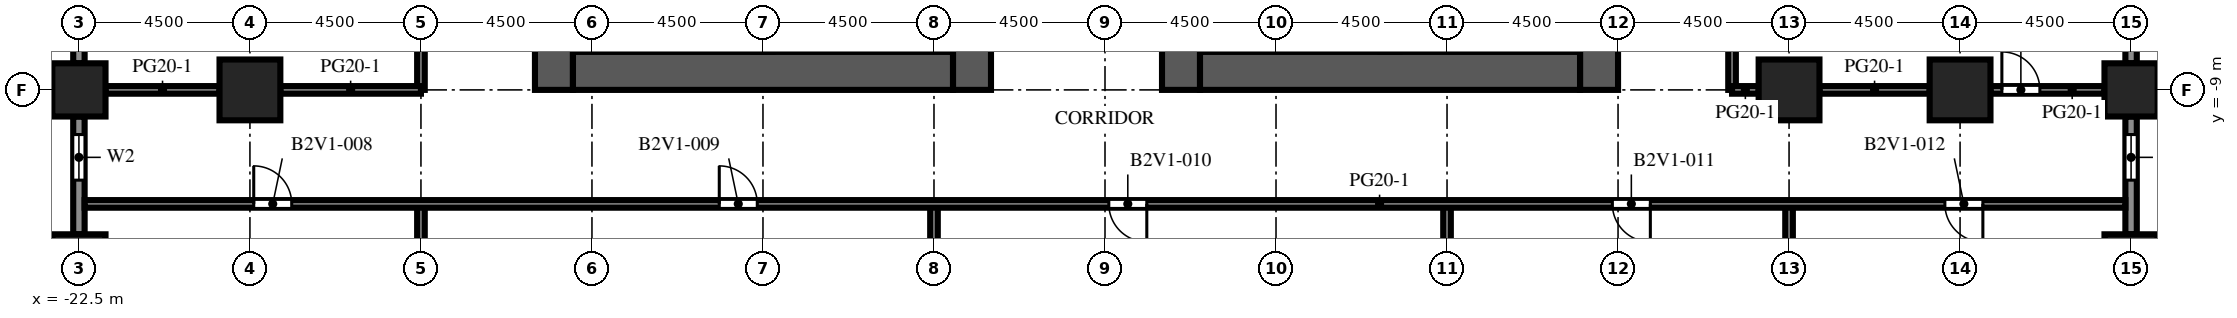
"""IFC4 building model, lengths in metres.
Left out: names, types, materials, properties, quantities, classifications, styles, units other than length and angle.
Written with IfcOpenShell. Run it as: python <this file> out.ifc"""

import sys

from ifc_helpers import new_model, si_unit, direction, frame, frame_2d, origin, origin_2d, place, context, subcontext, project, spatial, rectangle, extrude, element, fill, save


model = new_model("IFC4")
c1 = context("Model", 3, precision=1e-05, world=origin(), true_north=direction((0.0, 1.0)))
c2 = subcontext(c1, "Body", "Model", "MODEL_VIEW")
j1 = project(units=[si_unit("LENGTHUNIT", "METRE"), si_unit("PLANEANGLEUNIT", "RADIAN")], contexts=[c1])
p1 = place(None, origin())
s1 = spatial("IfcSite", under=j1, at=p1, CompositionType="ELEMENT")
p2 = place(p1, origin())
s2 = spatial("IfcBuilding", under=s1, at=p2, CompositionType="ELEMENT")
p3 = place(p2, frame((0.0, 0.0, 54.2)))
s3 = spatial("IfcBuildingStorey", under=s2, at=p3, CompositionType="ELEMENT", Elevation=54.2)
for number, where, z_axis, x_axis in (
    (1, (-22.5, -13.5, 0.0), (0.0, 0.0, 1.0), (1.0, 0.0, 0.0)),
    (2, (-22.5, -9.0, 0.0), (0.0, 0.0, 1.0), (1.0, 0.0, 0.0)),
    (3, (31.5, -13.5, 0.0), (0.0, 0.0, 1.0), (1.0, 0.0, 0.0)),
    (4, (31.5, -9.0, 0.0), (0.0, 0.0, 1.0), (1.0, 0.0, 0.0)),
):
    element("IfcColumn", number, at=place(p3, frame(where, z_axis=z_axis, x_axis=x_axis)), inside=s3, PredefinedType="COLUMN", context=c2, shape_type="SweptSolid", body=[
        extrude(rectangle(XDim=1.4, YDim=1.4, at=origin_2d()), origin(), (0.0, 0.0, 1.0), 4.1),
    ])
for number, where, z_axis, x_axis in (
    (5, (-18.0, -9.0, 0.0), (0.0, 0.0, 1.0), (1.0, 0.0, 0.0)),
    (6, (22.5, -9.0, 0.0), (0.0, 0.0, 1.0), (1.0, 0.0, 0.0)),
    (7, (27.0, -9.0, 0.0), (0.0, 0.0, 1.0), (1.0, 0.0, 0.0)),
):
    element("IfcColumn", number, at=place(p3, frame(where, z_axis=z_axis, x_axis=x_axis)), inside=s3, PredefinedType="COLUMN", context=c2, shape_type="SweptSolid", body=[
        extrude(rectangle(XDim=1.6, YDim=1.6, at=origin_2d()), origin(), (0.0, 0.0, 1.0), 4.1),
    ])
p4 = place(p3, frame((-10.0, -9.0, 0.0), z_axis=(0.0, 0.0, 1.0), x_axis=(0.0, 1.0, 0.0)))
e8 = element("IfcWall", 8, at=p4, inside=s3, PredefinedType="SHEAR", context=c2, shape_type="SweptSolid", body=[
    extrude(rectangle(XDim=27.5, YDim=1.0, at=frame_2d((13.75, 0.0))), origin(), (0.0, 0.0, 1.0), 4.1),
])
p5 = place(p4, frame((12.55, 0.0, 0.0)))
e9 = element("IfcOpeningElement", 9, at=p5, cuts=e8, PredefinedType="OPENING", context=c2, shape_type="SweptSolid", body=[
    extrude(rectangle(XDim=2.4, YDim=2.4, at=frame_2d((1.2, 1.2))), frame((0.0, 0.51, 0.0), z_axis=(0.0, -1.0, 0.0), x_axis=(1.0, 0.0, 0.0)), (0.0, 0.0, 1.0), 1.02),
])
p6 = place(p4, frame((6.825, 0.0, 0.0)))
e10 = element("IfcOpeningElement", 10, at=p6, cuts=e8, PredefinedType="OPENING", context=c2, shape_type="SweptSolid", body=[
    extrude(rectangle(XDim=1.2, YDim=2.1, at=frame_2d((0.6, 1.05))), frame((0.0, 0.51, 0.0), z_axis=(0.0, -1.0, 0.0), x_axis=(1.0, 0.0, 0.0)), (0.0, 0.0, 1.0), 1.02),
])
p7 = place(p4, frame((19.475, 0.0, 0.0)))
e11 = element("IfcOpeningElement", 11, at=p7, cuts=e8, PredefinedType="OPENING", context=c2, shape_type="SweptSolid", body=[
    extrude(rectangle(XDim=1.2, YDim=2.1, at=frame_2d((0.6, 1.05))), frame((0.0, 0.51, 0.0), z_axis=(0.0, -1.0, 0.0), x_axis=(1.0, 0.0, 0.0)), (0.0, 0.0, 1.0), 1.02),
])
p8 = place(p3, frame((1.0, -9.0, 0.0), z_axis=(0.0, 0.0, 1.0), x_axis=(0.0, 1.0, 0.0)))
e12 = element("IfcWall", 12, at=p8, inside=s3, PredefinedType="SHEAR", context=c2, shape_type="SweptSolid", body=[
    extrude(rectangle(XDim=27.5, YDim=1.0, at=frame_2d((13.75, 0.0))), origin(), (0.0, 0.0, 1.0), 4.1),
])
p9 = place(p8, frame((12.55, 0.0, 0.0)))
e13 = element("IfcOpeningElement", 13, at=p9, cuts=e12, PredefinedType="OPENING", context=c2, shape_type="SweptSolid", body=[
    extrude(rectangle(XDim=2.4, YDim=2.4, at=frame_2d((1.2, 1.2))), frame((0.0, 0.51, 0.0), z_axis=(0.0, -1.0, 0.0), x_axis=(1.0, 0.0, 0.0)), (0.0, 0.0, 1.0), 1.02),
])
p10 = place(p8, frame((4.025, 0.0, 0.0)))
e14 = element("IfcOpeningElement", 14, at=p10, cuts=e12, PredefinedType="OPENING", context=c2, shape_type="SweptSolid", body=[
    extrude(rectangle(XDim=1.2, YDim=2.1, at=frame_2d((0.6, 1.05))), frame((0.0, 0.51, 0.0), z_axis=(0.0, -1.0, 0.0), x_axis=(1.0, 0.0, 0.0)), (0.0, 0.0, 1.0), 1.02),
])
p11 = place(p8, frame((22.275, 0.0, 0.0)))
e15 = element("IfcOpeningElement", 15, at=p11, cuts=e12, PredefinedType="OPENING", context=c2, shape_type="SweptSolid", body=[
    extrude(rectangle(XDim=1.2, YDim=2.1, at=frame_2d((0.6, 1.05))), frame((0.0, 0.51, 0.0), z_axis=(0.0, -1.0, 0.0), x_axis=(1.0, 0.0, 0.0)), (0.0, 0.0, 1.0), 1.02),
])
p12 = place(p3, frame((-9.5, -8.5, 0.0), z_axis=(0.0, 0.0, 1.0), x_axis=(1.0, 0.0, 0.0)))
e16 = element("IfcWall", 16, at=p12, inside=s3, PredefinedType="SHEAR", context=c2, shape_type="SweptSolid", body=[
    extrude(rectangle(XDim=10.0, YDim=1.0, at=frame_2d((5.0, 0.0))), origin(), (0.0, 0.0, 1.0), 4.1),
])
p13 = place(p3, frame((6.5, -9.0, 0.0), z_axis=(0.0, 0.0, 1.0), x_axis=(0.0, 1.0, 0.0)))
e17 = element("IfcWall", 17, at=p13, inside=s3, PredefinedType="SHEAR", context=c2, shape_type="SweptSolid", body=[
    extrude(rectangle(XDim=27.5, YDim=1.0, at=frame_2d((13.75, 0.0))), origin(), (0.0, 0.0, 1.0), 4.1),
])
p14 = place(p13, frame((12.55, 0.0, 0.0)))
e18 = element("IfcOpeningElement", 18, at=p14, cuts=e17, PredefinedType="OPENING", context=c2, shape_type="SweptSolid", body=[
    extrude(rectangle(XDim=2.4, YDim=2.4, at=frame_2d((1.2, 1.2))), frame((0.0, 0.51, 0.0), z_axis=(0.0, -1.0, 0.0), x_axis=(1.0, 0.0, 0.0)), (0.0, 0.0, 1.0), 1.02),
])
p15 = place(p13, frame((4.025, 0.0, 0.0)))
e19 = element("IfcOpeningElement", 19, at=p15, cuts=e17, PredefinedType="OPENING", context=c2, shape_type="SweptSolid", body=[
    extrude(rectangle(XDim=1.2, YDim=2.1, at=frame_2d((0.6, 1.05))), frame((0.0, 0.51, 0.0), z_axis=(0.0, -1.0, 0.0), x_axis=(1.0, 0.0, 0.0)), (0.0, 0.0, 1.0), 1.02),
])
p16 = place(p13, frame((22.275, 0.0, 0.0)))
e20 = element("IfcOpeningElement", 20, at=p16, cuts=e17, PredefinedType="OPENING", context=c2, shape_type="SweptSolid", body=[
    extrude(rectangle(XDim=1.2, YDim=2.1, at=frame_2d((0.6, 1.05))), frame((0.0, 0.51, 0.0), z_axis=(0.0, -1.0, 0.0), x_axis=(1.0, 0.0, 0.0)), (0.0, 0.0, 1.0), 1.02),
])
p17 = place(p3, frame((17.5, -9.0, 0.0), z_axis=(0.0, 0.0, 1.0), x_axis=(0.0, 1.0, 0.0)))
e21 = element("IfcWall", 21, at=p17, inside=s3, PredefinedType="SHEAR", context=c2, shape_type="SweptSolid", body=[
    extrude(rectangle(XDim=27.5, YDim=1.0, at=frame_2d((13.75, 0.0))), origin(), (0.0, 0.0, 1.0), 4.1),
])
p18 = place(p17, frame((12.55, 0.0, 0.0)))
e22 = element("IfcOpeningElement", 22, at=p18, cuts=e21, PredefinedType="OPENING", context=c2, shape_type="SweptSolid", body=[
    extrude(rectangle(XDim=2.4, YDim=2.4, at=frame_2d((1.2, 1.2))), frame((0.0, 0.51, 0.0), z_axis=(0.0, -1.0, 0.0), x_axis=(1.0, 0.0, 0.0)), (0.0, 0.0, 1.0), 1.02),
])
p19 = place(p17, frame((6.825, 0.0, 0.0)))
e23 = element("IfcOpeningElement", 23, at=p19, cuts=e21, PredefinedType="OPENING", context=c2, shape_type="SweptSolid", body=[
    extrude(rectangle(XDim=1.2, YDim=2.1, at=frame_2d((0.6, 1.05))), frame((0.0, 0.51, 0.0), z_axis=(0.0, -1.0, 0.0), x_axis=(1.0, 0.0, 0.0)), (0.0, 0.0, 1.0), 1.02),
])
p20 = place(p17, frame((19.475, 0.0, 0.0)))
e24 = element("IfcOpeningElement", 24, at=p20, cuts=e21, PredefinedType="OPENING", context=c2, shape_type="SweptSolid", body=[
    extrude(rectangle(XDim=1.2, YDim=2.1, at=frame_2d((0.6, 1.05))), frame((0.0, 0.51, 0.0), z_axis=(0.0, -1.0, 0.0), x_axis=(1.0, 0.0, 0.0)), (0.0, 0.0, 1.0), 1.02),
])
p21 = place(p3, frame((7.0, -8.5, 0.0), z_axis=(0.0, 0.0, 1.0), x_axis=(1.0, 0.0, 0.0)))
e25 = element("IfcWall", 25, at=p21, inside=s3, PredefinedType="SHEAR", context=c2, shape_type="SweptSolid", body=[
    extrude(rectangle(XDim=10.0, YDim=1.0, at=frame_2d((5.0, 0.0))), origin(), (0.0, 0.0, 1.0), 4.1),
])
p22 = place(p3, frame((31.5, -9.7, 0.0), z_axis=(0.0, 0.0, 1.0), x_axis=(0.0, -1.0, 0.0)))
e26 = element("IfcWall", 26, at=p22, inside=s3, PredefinedType="SOLIDWALL", context=c2, shape_type="SweptSolid", body=[
    extrude(rectangle(XDim=3.1, YDim=0.3, at=frame_2d((1.55, 0.0))), origin(), (0.0, 0.0, 1.0), 2.75),
])
p23 = place(p22, frame((0.475, 0.0, 0.8)))
e27 = element("IfcOpeningElement", 27, at=p23, cuts=e26, PredefinedType="OPENING", context=c2, shape_type="SweptSolid", body=[
    extrude(rectangle(XDim=1.2, YDim=1.7, at=frame_2d((0.6, 0.85))), frame((0.0, 0.16, 0.0), z_axis=(0.0, -1.0, 0.0), x_axis=(1.0, 0.0, 0.0)), (0.0, 0.0, 1.0), 0.32),
])
p24 = place(p3, frame((31.5, -5.2, 0.0), z_axis=(0.0, 0.0, 1.0), x_axis=(0.0, -1.0, 0.0)))
e28 = element("IfcWall", 28, at=p24, inside=s3, PredefinedType="SOLIDWALL", context=c2, shape_type="SweptSolid", body=[
    extrude(rectangle(XDim=3.1, YDim=0.3, at=frame_2d((1.55, 0.0))), origin(), (0.0, 0.0, 1.0), 2.75),
])
p25 = place(p24, frame((0.35, 0.0, 0.8)))
e29 = element("IfcOpeningElement", 29, at=p25, cuts=e28, PredefinedType="OPENING", context=c2, shape_type="SweptSolid", body=[
    extrude(rectangle(XDim=2.4, YDim=1.7, at=frame_2d((1.2, 0.85))), frame((0.0, 0.16, 0.0), z_axis=(0.0, -1.0, 0.0), x_axis=(1.0, 0.0, 0.0)), (0.0, 0.0, 1.0), 0.32),
])
p26 = place(p3, frame((-22.5, -8.3, 0.0), z_axis=(0.0, 0.0, 1.0), x_axis=(0.0, 1.0, 0.0)))
e30 = element("IfcWall", 30, at=p26, inside=s3, PredefinedType="SOLIDWALL", context=c2, shape_type="SweptSolid", body=[
    extrude(rectangle(XDim=3.1, YDim=0.3, at=frame_2d((1.55, 0.0))), origin(), (0.0, 0.0, 1.0), 2.75),
])
p27 = place(p26, frame((0.35, 0.0, 0.8)))
e31 = element("IfcOpeningElement", 31, at=p27, cuts=e30, PredefinedType="OPENING", context=c2, shape_type="SweptSolid", body=[
    extrude(rectangle(XDim=2.4, YDim=1.7, at=frame_2d((1.2, 0.85))), frame((0.0, 0.16, 0.0), z_axis=(0.0, -1.0, 0.0), x_axis=(1.0, 0.0, 0.0)), (0.0, 0.0, 1.0), 0.32),
])
p28 = place(p3, frame((-22.5, -12.8, 0.0), z_axis=(0.0, 0.0, 1.0), x_axis=(0.0, 1.0, 0.0)))
e32 = element("IfcWall", 32, at=p28, inside=s3, PredefinedType="SOLIDWALL", context=c2, shape_type="SweptSolid", body=[
    extrude(rectangle(XDim=3.1, YDim=0.3, at=frame_2d((1.55, 0.0))), origin(), (0.0, 0.0, 1.0), 2.75),
])
p29 = place(p28, frame((1.425, 0.0, 0.8)))
e33 = element("IfcOpeningElement", 33, at=p29, cuts=e32, PredefinedType="OPENING", context=c2, shape_type="SweptSolid", body=[
    extrude(rectangle(XDim=1.2, YDim=1.7, at=frame_2d((0.6, 0.85))), frame((0.0, 0.16, 0.0), z_axis=(0.0, -1.0, 0.0), x_axis=(1.0, 0.0, 0.0)), (0.0, 0.0, 1.0), 0.32),
])
p30 = place(p3, frame((-1.0, -8.0, 0.0), z_axis=(0.0, 0.0, 1.0), x_axis=(0.0, 1.0, 0.0)))
e34 = element("IfcWall", 34, at=p30, inside=s3, PredefinedType="PARTITIONING", context=c2, shape_type="SweptSolid", body=[
    extrude(rectangle(XDim=2.175, YDim=0.1, at=frame_2d((1.087, 0.0))), origin(), (0.0, 0.0, 1.0), 3.65),
])
p31 = place(p30, frame((0.587, 0.0, 0.0)))
e35 = element("IfcOpeningElement", 35, at=p31, cuts=e34, PredefinedType="OPENING", context=c2, shape_type="SweptSolid", body=[
    extrude(rectangle(XDim=1.0, YDim=2.1, at=frame_2d((0.5, 1.05))), frame((0.0, 0.06, 0.0), z_axis=(0.0, -1.0, 0.0), x_axis=(1.0, 0.0, 0.0)), (0.0, 0.0, 1.0), 0.12),
])
p32 = place(p3, frame((8.5, -8.0, 0.0), z_axis=(0.0, 0.0, 1.0), x_axis=(0.0, 1.0, 0.0)))
e36 = element("IfcWall", 36, at=p32, inside=s3, PredefinedType="PARTITIONING", context=c2, shape_type="SweptSolid", body=[
    extrude(rectangle(XDim=2.175, YDim=0.1, at=frame_2d((1.087, 0.0))), origin(), (0.0, 0.0, 1.0), 3.65),
])
p33 = place(p32, frame((0.587, 0.0, 0.0)))
e37 = element("IfcOpeningElement", 37, at=p33, cuts=e36, PredefinedType="OPENING", context=c2, shape_type="SweptSolid", body=[
    extrude(rectangle(XDim=1.0, YDim=2.1, at=frame_2d((0.5, 1.05))), frame((0.0, 0.06, 0.0), z_axis=(0.0, -1.0, 0.0), x_axis=(1.0, 0.0, 0.0)), (0.0, 0.0, 1.0), 0.12),
])
p34 = place(p3, frame((-13.5, -26.3, 0.0), z_axis=(0.0, 0.0, 1.0), x_axis=(0.0, 1.0, 0.0)))
e38 = element("IfcWall", 38, at=p34, inside=s3, PredefinedType="PARTITIONING", context=c2, shape_type="SweptSolid", body=[
    extrude(rectangle(XDim=14.3, YDim=0.2, at=frame_2d((7.15, 0.0))), origin(), (0.0, 0.0, 1.0), 3.65),
])
p35 = place(p3, frame((-13.5, -9.0, 0.0), z_axis=(0.0, 0.0, 1.0), x_axis=(0.0, 1.0, 0.0)))
e39 = element("IfcWall", 39, at=p35, inside=s3, PredefinedType="PARTITIONING", context=c2, shape_type="SweptSolid", body=[
    extrude(rectangle(XDim=27.5, YDim=0.2, at=frame_2d((13.75, 0.0))), origin(), (0.0, 0.0, 1.0), 3.65),
])
p36 = place(p35, frame((5.1, 0.0, 0.0)))
e40 = element("IfcOpeningElement", 40, at=p36, cuts=e39, PredefinedType="OPENING", context=c2, shape_type="SweptSolid", body=[
    extrude(rectangle(XDim=1.0, YDim=2.1, at=frame_2d((0.5, 1.05))), frame((0.0, 0.11, 0.0), z_axis=(0.0, -1.0, 0.0), x_axis=(1.0, 0.0, 0.0)), (0.0, 0.0, 1.0), 0.22),
])
p37 = place(p35, frame((15.6, 0.0, 0.0)))
e41 = element("IfcOpeningElement", 41, at=p37, cuts=e39, PredefinedType="OPENING", context=c2, shape_type="SweptSolid", body=[
    extrude(rectangle(XDim=1.0, YDim=2.1, at=frame_2d((0.5, 1.05))), frame((0.0, 0.11, 0.0), z_axis=(0.0, -1.0, 0.0), x_axis=(1.0, 0.0, 0.0)), (0.0, 0.0, 1.0), 0.22),
])
p38 = place(p3, frame((0.0, -17.2, 0.0), z_axis=(0.0, 0.0, 1.0), x_axis=(0.0, 1.0, 0.0)))
e42 = element("IfcWall", 42, at=p38, inside=s3, PredefinedType="PARTITIONING", context=c2, shape_type="SweptSolid", body=[
    extrude(rectangle(XDim=5.2, YDim=0.2, at=frame_2d((2.6, 0.0))), origin(), (0.0, 0.0, 1.0), 3.65),
])
p39 = place(p3, frame((13.5, -26.3, 0.0), z_axis=(0.0, 0.0, 1.0), x_axis=(0.0, 1.0, 0.0)))
e43 = element("IfcWall", 43, at=p39, inside=s3, PredefinedType="PARTITIONING", context=c2, shape_type="SweptSolid", body=[
    extrude(rectangle(XDim=14.3, YDim=0.2, at=frame_2d((7.15, 0.0))), origin(), (0.0, 0.0, 1.0), 3.65),
])
p40 = place(p3, frame((21.0, 18.5, 0.0), z_axis=(0.0, 0.0, 1.0), x_axis=(0.0, -1.0, 0.0)))
e44 = element("IfcWall", 44, at=p40, inside=s3, PredefinedType="PARTITIONING", context=c2, shape_type="SweptSolid", body=[
    extrude(rectangle(XDim=27.5, YDim=0.2, at=frame_2d((13.75, 0.0))), origin(), (0.0, 0.0, 1.0), 3.65),
])
p41 = place(p40, frame((10.9, 0.0, 0.0)))
e45 = element("IfcOpeningElement", 45, at=p41, cuts=e44, PredefinedType="OPENING", context=c2, shape_type="SweptSolid", body=[
    extrude(rectangle(XDim=1.0, YDim=2.1, at=frame_2d((0.5, 1.05))), frame((0.0, 0.11, 0.0), z_axis=(0.0, -1.0, 0.0), x_axis=(1.0, 0.0, 0.0)), (0.0, 0.0, 1.0), 0.22),
])
p42 = place(p3, frame((22.5, -17.2, 0.0), z_axis=(0.0, 0.0, 1.0), x_axis=(0.0, 1.0, 0.0)))
e46 = element("IfcWall", 46, at=p42, inside=s3, PredefinedType="PARTITIONING", context=c2, shape_type="SweptSolid", body=[
    extrude(rectangle(XDim=5.2, YDim=0.2, at=frame_2d((2.6, 0.0))), origin(), (0.0, 0.0, 1.0), 3.65),
])
p43 = place(p3, frame((31.35, -12.0, 0.0), z_axis=(0.0, 0.0, 1.0), x_axis=(-1.0, 0.0, 0.0)))
e47 = element("IfcWall", 47, at=p43, inside=s3, PredefinedType="PARTITIONING", context=c2, shape_type="SweptSolid", body=[
    extrude(rectangle(XDim=53.7, YDim=0.2, at=frame_2d((26.85, 0.0))), origin(), (0.0, 0.0, 1.0), 3.65),
])
p44 = place(p43, frame((48.25, 0.0, 0.0)))
e48 = element("IfcOpeningElement", 48, at=p44, cuts=e47, PredefinedType="OPENING", context=c2, shape_type="SweptSolid", body=[
    extrude(rectangle(XDim=1.0, YDim=2.1, at=frame_2d((0.5, 1.05))), frame((0.0, 0.11, 0.0), z_axis=(0.0, -1.0, 0.0), x_axis=(1.0, 0.0, 0.0)), (0.0, 0.0, 1.0), 0.22),
])
p45 = place(p43, frame((36.0, 0.0, 0.0)))
e49 = element("IfcOpeningElement", 49, at=p45, cuts=e47, PredefinedType="OPENING", context=c2, shape_type="SweptSolid", body=[
    extrude(rectangle(XDim=1.0, YDim=2.1, at=frame_2d((0.5, 1.05))), frame((0.0, 0.11, 0.0), z_axis=(0.0, -1.0, 0.0), x_axis=(1.0, 0.0, 0.0)), (0.0, 0.0, 1.0), 0.22),
])
p46 = place(p43, frame((25.75, 0.0, 0.0)))
e50 = element("IfcOpeningElement", 50, at=p46, cuts=e47, PredefinedType="OPENING", context=c2, shape_type="SweptSolid", body=[
    extrude(rectangle(XDim=1.0, YDim=2.1, at=frame_2d((0.5, 1.05))), frame((0.0, 0.11, 0.0), z_axis=(0.0, -1.0, 0.0), x_axis=(1.0, 0.0, 0.0)), (0.0, 0.0, 1.0), 0.22),
])
p47 = place(p43, frame((12.5, 0.0, 0.0)))
e51 = element("IfcOpeningElement", 51, at=p47, cuts=e47, PredefinedType="OPENING", context=c2, shape_type="SweptSolid", body=[
    extrude(rectangle(XDim=1.0, YDim=2.1, at=frame_2d((0.5, 1.05))), frame((0.0, 0.11, 0.0), z_axis=(0.0, -1.0, 0.0), x_axis=(1.0, 0.0, 0.0)), (0.0, 0.0, 1.0), 0.22),
])
p48 = place(p43, frame((3.75, 0.0, 0.0)))
e52 = element("IfcOpeningElement", 52, at=p48, cuts=e47, PredefinedType="OPENING", context=c2, shape_type="SweptSolid", body=[
    extrude(rectangle(XDim=1.0, YDim=2.1, at=frame_2d((0.5, 1.05))), frame((0.0, 0.11, 0.0), z_axis=(0.0, -1.0, 0.0), x_axis=(1.0, 0.0, 0.0)), (0.0, 0.0, 1.0), 0.22),
])
p49 = place(p3, frame((-21.8, -9.0, 0.0), z_axis=(0.0, 0.0, 1.0), x_axis=(1.0, 0.0, 0.0)))
e53 = element("IfcWall", 53, at=p49, inside=s3, PredefinedType="PARTITIONING", context=c2, shape_type="SweptSolid", body=[
    extrude(rectangle(XDim=3.0, YDim=0.2, at=frame_2d((1.5, 0.0))), origin(), (0.0, 0.0, 1.0), 3.65),
])
p50 = place(p3, frame((-17.2, -9.0, 0.0), z_axis=(0.0, 0.0, 1.0), x_axis=(1.0, 0.0, 0.0)))
e54 = element("IfcWall", 54, at=p50, inside=s3, PredefinedType="PARTITIONING", context=c2, shape_type="SweptSolid", body=[
    extrude(rectangle(XDim=3.7, YDim=0.2, at=frame_2d((1.85, 0.0))), origin(), (0.0, 0.0, 1.0), 3.65),
])
p51 = place(p3, frame((21.0, -9.0, 0.0), z_axis=(0.0, 0.0, 1.0), x_axis=(1.0, 0.0, 0.0)))
e55 = element("IfcWall", 55, at=p51, inside=s3, PredefinedType="PARTITIONING", context=c2, shape_type="SweptSolid", body=[
    extrude(rectangle(XDim=0.7, YDim=0.2, at=frame_2d((0.35, 0.0))), origin(), (0.0, 0.0, 1.0), 3.65),
])
p52 = place(p3, frame((23.3, -9.0, 0.0), z_axis=(0.0, 0.0, 1.0), x_axis=(1.0, 0.0, 0.0)))
e56 = element("IfcWall", 56, at=p52, inside=s3, PredefinedType="PARTITIONING", context=c2, shape_type="SweptSolid", body=[
    extrude(rectangle(XDim=2.9, YDim=0.2, at=frame_2d((1.45, 0.0))), origin(), (0.0, 0.0, 1.0), 3.65),
])
p53 = place(p3, frame((27.8, -9.0, 0.0), z_axis=(0.0, 0.0, 1.0), x_axis=(1.0, 0.0, 0.0)))
e57 = element("IfcWall", 57, at=p53, inside=s3, PredefinedType="PARTITIONING", context=c2, shape_type="SweptSolid", body=[
    extrude(rectangle(XDim=3.0, YDim=0.2, at=frame_2d((1.5, 0.0))), origin(), (0.0, 0.0, 1.0), 3.65),
])
p54 = place(p53, frame((0.3, 0.0, 0.0)))
e58 = element("IfcOpeningElement", 58, at=p54, cuts=e57, PredefinedType="OPENING", context=c2, shape_type="SweptSolid", body=[
    extrude(rectangle(XDim=1.0, YDim=2.1, at=frame_2d((0.5, 1.05))), frame((0.0, 0.11, 0.0), z_axis=(0.0, -1.0, 0.0), x_axis=(1.0, 0.0, 0.0)), (0.0, 0.0, 1.0), 0.22),
])
p55 = place(p23, origin())
e59 = element("IfcWindow", 59, at=p55, inside=s3, PartitioningType="SINGLE_PANEL", PredefinedType="WINDOW", context=c2, shape_type="SweptSolid", body=[
    extrude(rectangle(XDim=1.2, YDim=1.7, at=frame_2d((0.6, 0.85))), frame((0.0, 0.03, 0.0), z_axis=(0.0, -1.0, 0.0), x_axis=(1.0, 0.0, 0.0)), (0.0, 0.0, 1.0), 0.06),
])
fill(e27, e59)
p56 = place(p29, origin())
e60 = element("IfcWindow", 60, at=p56, inside=s3, PartitioningType="SINGLE_PANEL", PredefinedType="WINDOW", context=c2, shape_type="SweptSolid", body=[
    extrude(rectangle(XDim=1.2, YDim=1.7, at=frame_2d((0.6, 0.85))), frame((0.0, 0.03, 0.0), z_axis=(0.0, -1.0, 0.0), x_axis=(1.0, 0.0, 0.0)), (0.0, 0.0, 1.0), 0.06),
])
fill(e33, e60)
p57 = place(p44, origin())
e61 = element("IfcDoor", 61, at=p57, inside=s3, OperationType="SINGLE_SWING_RIGHT", PredefinedType="DOOR", context=c2, shape_type="SweptSolid", body=[
    extrude(rectangle(XDim=1.0, YDim=2.1, at=frame_2d((0.5, 1.05))), frame((0.0, 0.025, 0.0), z_axis=(0.0, -1.0, 0.0), x_axis=(1.0, 0.0, 0.0)), (0.0, 0.0, 1.0), 0.05),
])
fill(e48, e61)
p58 = place(p45, origin())
e62 = element("IfcDoor", 62, at=p58, inside=s3, OperationType="SINGLE_SWING_RIGHT", PredefinedType="DOOR", context=c2, shape_type="SweptSolid", body=[
    extrude(rectangle(XDim=1.0, YDim=2.1, at=frame_2d((0.5, 1.05))), frame((0.0, 0.025, 0.0), z_axis=(0.0, -1.0, 0.0), x_axis=(1.0, 0.0, 0.0)), (0.0, 0.0, 1.0), 0.05),
])
fill(e49, e62)
p59 = place(p46, origin())
e63 = element("IfcDoor", 63, at=p59, inside=s3, OperationType="SINGLE_SWING_LEFT", PredefinedType="DOOR", context=c2, shape_type="SweptSolid", body=[
    extrude(rectangle(XDim=1.0, YDim=2.1, at=frame_2d((0.5, 1.05))), frame((0.0, 0.025, 0.0), z_axis=(0.0, -1.0, 0.0), x_axis=(1.0, 0.0, 0.0)), (0.0, 0.0, 1.0), 0.05),
])
fill(e50, e63)
p60 = place(p47, origin())
e64 = element("IfcDoor", 64, at=p60, inside=s3, OperationType="SINGLE_SWING_LEFT", PredefinedType="DOOR", context=c2, shape_type="SweptSolid", body=[
    extrude(rectangle(XDim=1.0, YDim=2.1, at=frame_2d((0.5, 1.05))), frame((0.0, 0.025, 0.0), z_axis=(0.0, -1.0, 0.0), x_axis=(1.0, 0.0, 0.0)), (0.0, 0.0, 1.0), 0.05),
])
fill(e51, e64)
p61 = place(p48, origin())
e65 = element("IfcDoor", 65, at=p61, inside=s3, OperationType="SINGLE_SWING_LEFT", PredefinedType="DOOR", context=c2, shape_type="SweptSolid", body=[
    extrude(rectangle(XDim=1.0, YDim=2.1, at=frame_2d((0.5, 1.05))), frame((0.0, 0.025, 0.0), z_axis=(0.0, -1.0, 0.0), x_axis=(1.0, 0.0, 0.0)), (0.0, 0.0, 1.0), 0.05),
])
fill(e52, e65)
p62 = place(p54, origin())
e66 = element("IfcDoor", 66, at=p62, inside=s3, OperationType="SINGLE_SWING_LEFT", PredefinedType="DOOR", context=c2, shape_type="SweptSolid", body=[
    extrude(rectangle(XDim=1.0, YDim=2.1, at=frame_2d((0.5, 1.05))), frame((0.0, 0.025, 0.0), z_axis=(0.0, -1.0, 0.0), x_axis=(1.0, 0.0, 0.0)), (0.0, 0.0, 1.0), 0.05),
])
fill(e58, e66)
save(model, sys.argv[1])
